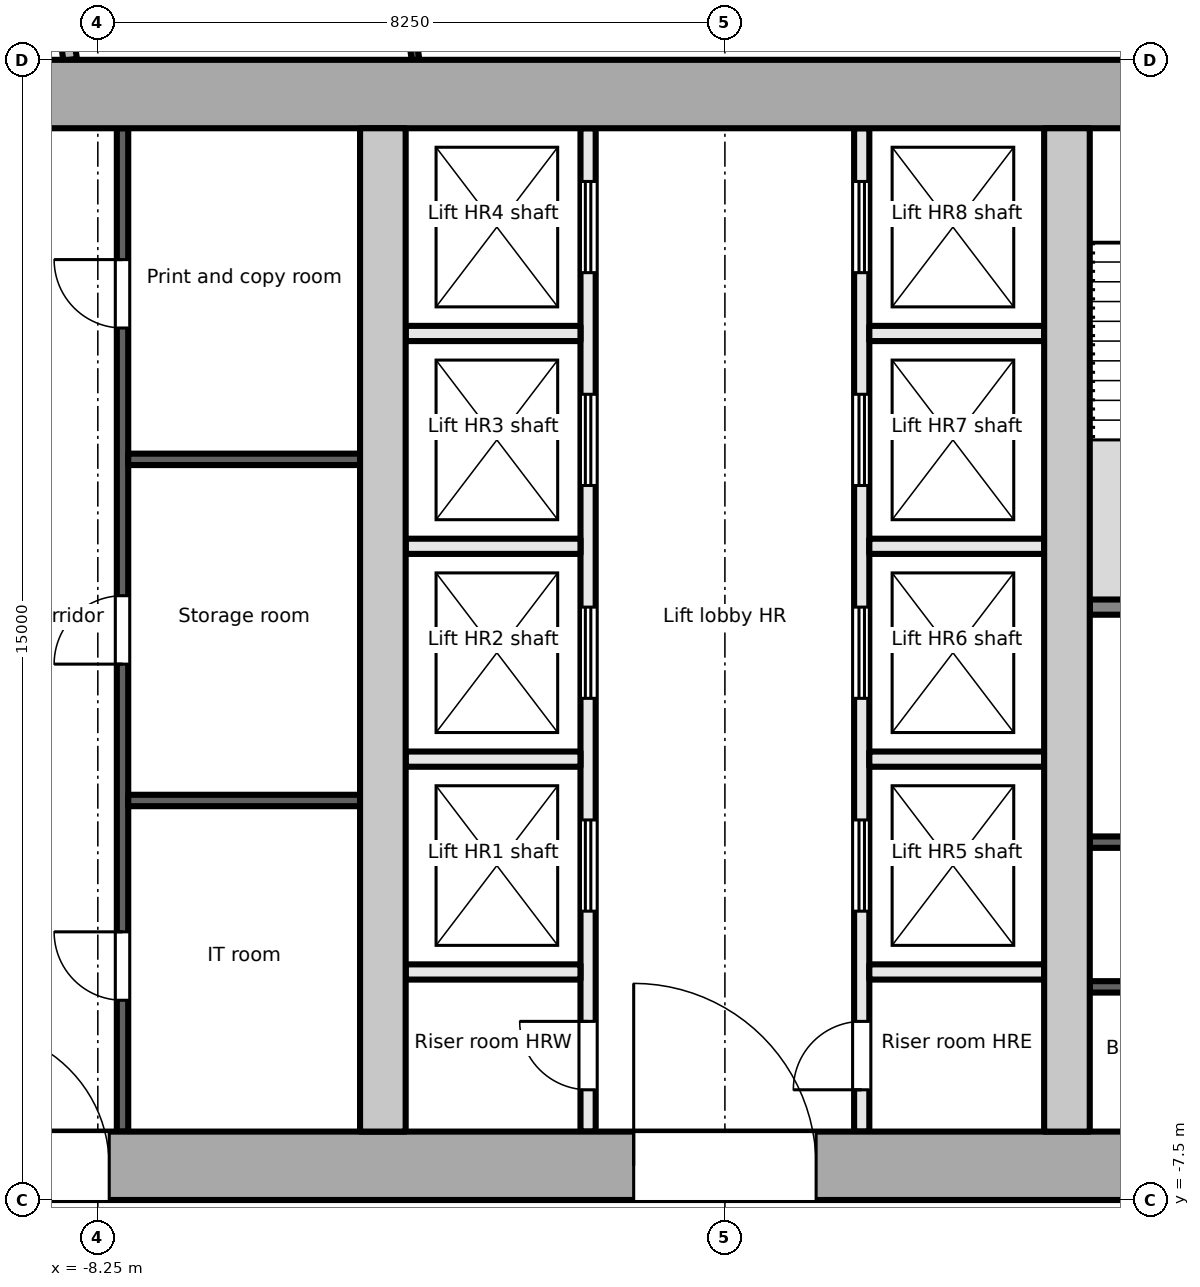
"""IFC4 building model, lengths in metres.
Left out: names, types, materials, properties, quantities, classifications, styles, units other than length and angle.
Written with IfcOpenShell. Run it as: python <this file> out.ifc"""

import sys

from ifc_helpers import new_model, si_unit, direction, frame, frame_2d, origin, place, context, subcontext, project, spatial, rectangle, extrude, element, fill, save


model = new_model("IFC4")
c1 = context("Model", 3, precision=1e-05, world=origin(), true_north=direction((0.0, 1.0)))
c2 = subcontext(c1, "Body", "Model", "MODEL_VIEW")
j1 = project(units=[si_unit("LENGTHUNIT", "METRE"), si_unit("PLANEANGLEUNIT", "RADIAN")], contexts=[c1])
p1 = place(None, origin())
s1 = spatial("IfcSite", under=j1, at=p1, CompositionType="ELEMENT")
p2 = place(p1, origin())
s2 = spatial("IfcBuilding", under=s1, at=p2, CompositionType="ELEMENT")
p3 = place(p2, frame((0.0, 0.0, 262.9)))
s3 = spatial("IfcBuildingStorey", under=s2, at=p3, CompositionType="ELEMENT", Elevation=262.9)
p4 = place(p3, frame((-18.0, -7.05, -0.2), z_axis=(0.0, 0.0, 1.0), x_axis=(1.0, 0.0, 0.0)))
e1 = element("IfcWall", 1, at=p4, inside=s3, PredefinedType="SHEAR", context=c2, shape_type="SweptSolid", body=[
    extrude(rectangle(XDim=36.0, YDim=0.9, at=frame_2d((18.0, 0.0))), origin(), (0.0, 0.0, 1.0), 3.9),
])
p5 = place(p4, frame((8.1, 0.0, 0.2)))
e2 = element("IfcOpeningElement", 2, at=p5, cuts=e1, PredefinedType="OPENING", context=c2, shape_type="SweptSolid", body=[
    extrude(rectangle(XDim=1.8, YDim=2.1, at=frame_2d((0.9, 1.05))), frame((0.0, 0.46, 0.0), z_axis=(0.0, -1.0, 0.0), x_axis=(1.0, 0.0, 0.0)), (0.0, 0.0, 1.0), 0.921),
])
p6 = place(p4, frame((16.8, 0.0, 0.2)))
e3 = element("IfcOpeningElement", 3, at=p6, cuts=e1, PredefinedType="OPENING", context=c2, shape_type="SweptSolid", body=[
    extrude(rectangle(XDim=2.4, YDim=2.1, at=frame_2d((1.2, 1.05))), frame((0.0, 0.46, 0.0), z_axis=(0.0, -1.0, 0.0), x_axis=(1.0, 0.0, 0.0)), (0.0, 0.0, 1.0), 0.921),
])
p7 = place(p4, frame((26.1, 0.0, 0.2)))
e4 = element("IfcOpeningElement", 4, at=p7, cuts=e1, PredefinedType="OPENING", context=c2, shape_type="SweptSolid", body=[
    extrude(rectangle(XDim=2.4, YDim=2.1, at=frame_2d((1.2, 1.05))), frame((0.0, 0.46, 0.0), z_axis=(0.0, -1.0, 0.0), x_axis=(1.0, 0.0, 0.0)), (0.0, 0.0, 1.0), 0.921),
])
p8 = place(p3, frame((-18.0, 7.05, -0.2), z_axis=(0.0, 0.0, 1.0), x_axis=(1.0, 0.0, 0.0)))
e5 = element("IfcWall", 5, at=p8, inside=s3, PredefinedType="SHEAR", context=c2, shape_type="SweptSolid", body=[
    extrude(rectangle(XDim=36.0, YDim=0.9, at=frame_2d((18.0, 0.0))), origin(), (0.0, 0.0, 1.0), 3.9),
])
for number, where, z_axis, x_axis in (
    (6, (-4.5, -6.6, -0.2), (0.0, 0.0, 1.0), (0.0, 1.0, 0.0)),
    (7, (4.5, -6.6, -0.2), (0.0, 0.0, 1.0), (0.0, 1.0, 0.0)),
):
    element("IfcWall", number, at=place(p3, frame(where, z_axis=z_axis, x_axis=x_axis)), inside=s3, PredefinedType="SHEAR", context=c2, shape_type="SweptSolid", body=[
        extrude(rectangle(XDim=13.2, YDim=0.6, at=frame_2d((6.6, 0.0))), origin(), (0.0, 0.0, 1.0), 3.9),
    ])
p9 = place(p3, frame((-7.925, -6.6, 0.0), z_axis=(0.0, 0.0, 1.0), x_axis=(0.0, 1.0, 0.0)))
e8 = element("IfcWall", 8, at=p9, inside=s3, PredefinedType="PARTITIONING", context=c2, shape_type="SweptSolid", body=[
    extrude(rectangle(XDim=13.2, YDim=0.15, at=frame_2d((6.6, 0.0))), origin(), (0.0, 0.0, 1.0), 3.7),
])
p10 = place(p9, frame((1.728, 0.0, 0.0)))
e9 = element("IfcOpeningElement", 9, at=p10, cuts=e8, PredefinedType="OPENING", context=c2, shape_type="SweptSolid", body=[
    extrude(rectangle(XDim=0.9, YDim=2.1, at=frame_2d((0.45, 1.05))), frame((0.0, 0.085, 0.0), z_axis=(0.0, -1.0, 0.0), x_axis=(1.0, 0.0, 0.0)), (0.0, 0.0, 1.0), 0.171),
])
p11 = place(p9, frame((6.15, 0.0, 0.0)))
e10 = element("IfcOpeningElement", 10, at=p11, cuts=e8, PredefinedType="OPENING", context=c2, shape_type="SweptSolid", body=[
    extrude(rectangle(XDim=0.9, YDim=2.1, at=frame_2d((0.45, 1.05))), frame((0.0, 0.085, 0.0), z_axis=(0.0, -1.0, 0.0), x_axis=(1.0, 0.0, 0.0)), (0.0, 0.0, 1.0), 0.171),
])
p12 = place(p9, frame((10.572, 0.0, 0.0)))
e11 = element("IfcOpeningElement", 11, at=p12, cuts=e8, PredefinedType="OPENING", context=c2, shape_type="SweptSolid", body=[
    extrude(rectangle(XDim=0.9, YDim=2.1, at=frame_2d((0.45, 1.05))), frame((0.0, 0.085, 0.0), z_axis=(0.0, -1.0, 0.0), x_axis=(1.0, 0.0, 0.0)), (0.0, 0.0, 1.0), 0.171),
])
for number, where, z_axis, x_axis in (
    (12, (-7.85, -2.244, 0.0), (0.0, 0.0, 1.0), (1.0, 0.0, 0.0)),
    (13, (-7.85, 2.244, 0.0), (0.0, 0.0, 1.0), (1.0, 0.0, 0.0)),
):
    element("IfcWall", number, at=place(p3, frame(where, z_axis=z_axis, x_axis=x_axis)), inside=s3, PredefinedType="PARTITIONING", context=c2, shape_type="SweptSolid", body=[
        extrude(rectangle(XDim=3.05, YDim=0.15, at=frame_2d((1.525, 0.0))), origin(), (0.0, 0.0, 1.0), 3.7),
    ])
p13 = place(p3, frame((-1.8, -6.6, 0.0), z_axis=(0.0, 0.0, 1.0), x_axis=(0.0, 1.0, 0.0)))
e14 = element("IfcWall", 14, at=p13, inside=s3, PredefinedType="PARTITIONING", context=c2, shape_type="SweptSolid", body=[
    extrude(rectangle(XDim=13.2, YDim=0.2, at=frame_2d((6.6, 0.0))), origin(), (0.0, 0.0, 1.0), 3.7),
])
p14 = place(p13, frame((0.55, 0.0, 0.0)))
e15 = element("IfcOpeningElement", 15, at=p14, cuts=e14, PredefinedType="OPENING", context=c2, shape_type="SweptSolid", body=[
    extrude(rectangle(XDim=0.9, YDim=2.1, at=frame_2d((0.45, 1.05))), frame((0.0, 0.111, 0.0), z_axis=(0.0, -1.0, 0.0), x_axis=(1.0, 0.0, 0.0)), (0.0, 0.0, 1.0), 0.221),
])
p15 = place(p13, frame((2.9, 0.0, 0.0)))
e16 = element("IfcOpeningElement", 16, at=p15, cuts=e14, PredefinedType="OPENING", context=c2, shape_type="SweptSolid", body=[
    extrude(rectangle(XDim=1.2, YDim=2.1, at=frame_2d((0.6, 1.05))), frame((0.0, 0.111, 0.0), z_axis=(0.0, -1.0, 0.0), x_axis=(1.0, 0.0, 0.0)), (0.0, 0.0, 1.0), 0.221),
])
p16 = place(p13, frame((5.7, 0.0, 0.0)))
e17 = element("IfcOpeningElement", 17, at=p16, cuts=e14, PredefinedType="OPENING", context=c2, shape_type="SweptSolid", body=[
    extrude(rectangle(XDim=1.2, YDim=2.1, at=frame_2d((0.6, 1.05))), frame((0.0, 0.111, 0.0), z_axis=(0.0, -1.0, 0.0), x_axis=(1.0, 0.0, 0.0)), (0.0, 0.0, 1.0), 0.221),
])
p17 = place(p13, frame((8.5, 0.0, 0.0)))
e18 = element("IfcOpeningElement", 18, at=p17, cuts=e14, PredefinedType="OPENING", context=c2, shape_type="SweptSolid", body=[
    extrude(rectangle(XDim=1.2, YDim=2.1, at=frame_2d((0.6, 1.05))), frame((0.0, 0.111, 0.0), z_axis=(0.0, -1.0, 0.0), x_axis=(1.0, 0.0, 0.0)), (0.0, 0.0, 1.0), 0.221),
])
p18 = place(p13, frame((11.3, 0.0, 0.0)))
e19 = element("IfcOpeningElement", 19, at=p18, cuts=e14, PredefinedType="OPENING", context=c2, shape_type="SweptSolid", body=[
    extrude(rectangle(XDim=1.2, YDim=2.1, at=frame_2d((0.6, 1.05))), frame((0.0, 0.111, 0.0), z_axis=(0.0, -1.0, 0.0), x_axis=(1.0, 0.0, 0.0)), (0.0, 0.0, 1.0), 0.221),
])
p19 = place(p3, frame((1.8, -6.6, 0.0), z_axis=(0.0, 0.0, 1.0), x_axis=(0.0, 1.0, 0.0)))
e20 = element("IfcWall", 20, at=p19, inside=s3, PredefinedType="PARTITIONING", context=c2, shape_type="SweptSolid", body=[
    extrude(rectangle(XDim=13.2, YDim=0.2, at=frame_2d((6.6, 0.0))), origin(), (0.0, 0.0, 1.0), 3.7),
])
p20 = place(p19, frame((0.55, 0.0, 0.0)))
e21 = element("IfcOpeningElement", 21, at=p20, cuts=e20, PredefinedType="OPENING", context=c2, shape_type="SweptSolid", body=[
    extrude(rectangle(XDim=0.9, YDim=2.1, at=frame_2d((0.45, 1.05))), frame((0.0, 0.111, 0.0), z_axis=(0.0, -1.0, 0.0), x_axis=(1.0, 0.0, 0.0)), (0.0, 0.0, 1.0), 0.221),
])
p21 = place(p19, frame((2.9, 0.0, 0.0)))
e22 = element("IfcOpeningElement", 22, at=p21, cuts=e20, PredefinedType="OPENING", context=c2, shape_type="SweptSolid", body=[
    extrude(rectangle(XDim=1.2, YDim=2.1, at=frame_2d((0.6, 1.05))), frame((0.0, 0.111, 0.0), z_axis=(0.0, -1.0, 0.0), x_axis=(1.0, 0.0, 0.0)), (0.0, 0.0, 1.0), 0.221),
])
p22 = place(p19, frame((5.7, 0.0, 0.0)))
e23 = element("IfcOpeningElement", 23, at=p22, cuts=e20, PredefinedType="OPENING", context=c2, shape_type="SweptSolid", body=[
    extrude(rectangle(XDim=1.2, YDim=2.1, at=frame_2d((0.6, 1.05))), frame((0.0, 0.111, 0.0), z_axis=(0.0, -1.0, 0.0), x_axis=(1.0, 0.0, 0.0)), (0.0, 0.0, 1.0), 0.221),
])
p23 = place(p19, frame((8.5, 0.0, 0.0)))
e24 = element("IfcOpeningElement", 24, at=p23, cuts=e20, PredefinedType="OPENING", context=c2, shape_type="SweptSolid", body=[
    extrude(rectangle(XDim=1.2, YDim=2.1, at=frame_2d((0.6, 1.05))), frame((0.0, 0.111, 0.0), z_axis=(0.0, -1.0, 0.0), x_axis=(1.0, 0.0, 0.0)), (0.0, 0.0, 1.0), 0.221),
])
p24 = place(p19, frame((11.3, 0.0, 0.0)))
e25 = element("IfcOpeningElement", 25, at=p24, cuts=e20, PredefinedType="OPENING", context=c2, shape_type="SweptSolid", body=[
    extrude(rectangle(XDim=1.2, YDim=2.1, at=frame_2d((0.6, 1.05))), frame((0.0, 0.111, 0.0), z_axis=(0.0, -1.0, 0.0), x_axis=(1.0, 0.0, 0.0)), (0.0, 0.0, 1.0), 0.221),
])
for number, where, z_axis, x_axis in (
    (26, (-4.2, -1.7, 0.0), (0.0, 0.0, 1.0), (1.0, 0.0, 0.0)),
    (27, (-4.2, 1.1, 0.0), (0.0, 0.0, 1.0), (1.0, 0.0, 0.0)),
    (28, (-4.2, 3.9, 0.0), (0.0, 0.0, 1.0), (1.0, 0.0, 0.0)),
    (29, (-4.2, -4.5, 0.0), (0.0, 0.0, 1.0), (1.0, 0.0, 0.0)),
    (30, (1.9, -1.7, 0.0), (0.0, 0.0, 1.0), (1.0, 0.0, 0.0)),
    (31, (1.9, 1.1, 0.0), (0.0, 0.0, 1.0), (1.0, 0.0, 0.0)),
    (32, (1.9, 3.9, 0.0), (0.0, 0.0, 1.0), (1.0, 0.0, 0.0)),
    (33, (1.9, -4.5, 0.0), (0.0, 0.0, 1.0), (1.0, 0.0, 0.0)),
):
    element("IfcWall", number, at=place(p3, frame(where, z_axis=z_axis, x_axis=x_axis)), inside=s3, PredefinedType="PARTITIONING", context=c2, shape_type="SweptSolid", body=[
        extrude(rectangle(XDim=2.3, YDim=0.2, at=frame_2d((1.15, 0.0))), origin(), (0.0, 0.0, 1.0), 3.7),
    ])
p25 = place(p3, frame((4.8, 0.3, 0.0), z_axis=(0.0, 0.0, 1.0), x_axis=(1.0, 0.0, 0.0)))
e34 = element("IfcWall", 34, at=p25, inside=s3, PredefinedType="PARTITIONING", context=c2, shape_type="SweptSolid", body=[
    extrude(rectangle(XDim=3.15, YDim=0.2, at=frame_2d((1.575, 0.0))), origin(), (0.0, 0.0, 1.0), 3.7),
])
for number, where, z_axis, x_axis in (
    (35, (4.8, -4.696, 0.0), (0.0, 0.0, 1.0), (1.0, 0.0, 0.0)),
    (36, (4.8, -2.792, 0.0), (0.0, 0.0, 1.0), (1.0, 0.0, 0.0)),
):
    element("IfcWall", number, at=place(p3, frame(where, z_axis=z_axis, x_axis=x_axis)), inside=s3, PredefinedType="PARTITIONING", context=c2, shape_type="SweptSolid", body=[
        extrude(rectangle(XDim=3.15, YDim=0.15, at=frame_2d((1.575, 0.0))), origin(), (0.0, 0.0, 1.0), 3.7),
    ])
p26 = place(p3, frame((-9.273, 12.191, 0.0), z_axis=(0.0, 0.0, 1.0), x_axis=(0.139104789371, -0.990277666907, 0.0)))
e37 = element("IfcWall", 37, at=p26, inside=s3, PredefinedType="PARTITIONING", context=c2, shape_type="SweptSolid", body=[
    extrude(rectangle(XDim=4.737, YDim=0.18, at=frame_2d((2.369, 0.0))), origin(), (0.0, 0.0, 1.0), 3.4),
])
p27 = place(p3, frame((-4.07, 7.5, 0.0), z_axis=(0.0, 0.0, 1.0), x_axis=(-0.139122430522, 0.990275188685, 0.0)))
e38 = element("IfcWall", 38, at=p27, inside=s3, PredefinedType="PARTITIONING", context=c2, shape_type="SweptSolid", body=[
    extrude(rectangle(XDim=5.368, YDim=0.1, at=frame_2d((2.684, 0.0))), origin(), (0.0, 0.0, 1.0), 3.4),
])
p28 = place(p27, frame((3.098, 0.0, 0.0)))
e39 = element("IfcOpeningElement", 39, at=p28, cuts=e38, PredefinedType="OPENING", context=c2, shape_type="SweptSolid", body=[
    extrude(rectangle(XDim=0.8, YDim=2.1, at=frame_2d((0.4, 1.05))), frame((0.0, 0.061, 0.0), z_axis=(0.0, -1.0, 0.0), x_axis=(1.0, 0.0, 0.0)), (0.0, 0.0, 1.0), 0.121),
])
p29 = place(p27, frame((0.649, 0.0, 0.9)))
e40 = element("IfcOpeningElement", 40, at=p29, cuts=e38, PredefinedType="OPENING", context=c2, shape_type="SweptSolid", body=[
    extrude(rectangle(XDim=1.8, YDim=1.2, at=frame_2d((0.9, 0.6))), frame((0.0, 0.061, 0.0), z_axis=(0.0, -1.0, 0.0), x_axis=(1.0, 0.0, 0.0)), (0.0, 0.0, 1.0), 0.121),
])
p30 = place(p10, origin())
e41 = element("IfcDoor", 41, at=p30, inside=s3, OperationType="SINGLE_SWING_RIGHT", PredefinedType="DOOR", context=c2, shape_type="SweptSolid", body=[
    extrude(rectangle(XDim=0.9, YDim=2.1, at=frame_2d((0.45, 1.05))), frame((0.0, 0.025, 0.0), z_axis=(0.0, -1.0, 0.0), x_axis=(1.0, 0.0, 0.0)), (0.0, 0.0, 1.0), 0.05),
])
fill(e9, e41)
p31 = place(p11, origin())
e42 = element("IfcDoor", 42, at=p31, inside=s3, OperationType="SINGLE_SWING_LEFT", PredefinedType="DOOR", context=c2, shape_type="SweptSolid", body=[
    extrude(rectangle(XDim=0.9, YDim=2.1, at=frame_2d((0.45, 1.05))), frame((0.0, 0.025, 0.0), z_axis=(0.0, -1.0, 0.0), x_axis=(1.0, 0.0, 0.0)), (0.0, 0.0, 1.0), 0.05),
])
fill(e10, e42)
p32 = place(p12, origin())
e43 = element("IfcDoor", 43, at=p32, inside=s3, OperationType="SINGLE_SWING_RIGHT", PredefinedType="DOOR", context=c2, shape_type="SweptSolid", body=[
    extrude(rectangle(XDim=0.9, YDim=2.1, at=frame_2d((0.45, 1.05))), frame((0.0, 0.025, 0.0), z_axis=(0.0, -1.0, 0.0), x_axis=(1.0, 0.0, 0.0)), (0.0, 0.0, 1.0), 0.05),
])
fill(e11, e43)
p33 = place(p5, origin())
e44 = element("IfcDoor", 44, at=p33, inside=s3, OperationType="SINGLE_SWING_LEFT", PredefinedType="DOOR", context=c2, shape_type="SweptSolid", body=[
    extrude(rectangle(XDim=1.8, YDim=2.1, at=frame_2d((0.9, 1.05))), frame((0.0, 0.025, 0.0), z_axis=(0.0, -1.0, 0.0), x_axis=(1.0, 0.0, 0.0)), (0.0, 0.0, 1.0), 0.05),
])
fill(e2, e44)
p34 = place(p14, origin())
e45 = element("IfcDoor", 45, at=p34, inside=s3, OperationType="SINGLE_SWING_RIGHT", PredefinedType="DOOR", context=c2, shape_type="SweptSolid", body=[
    extrude(rectangle(XDim=0.9, YDim=2.1, at=frame_2d((0.45, 1.05))), frame((0.0, 0.025, 0.0), z_axis=(0.0, -1.0, 0.0), x_axis=(1.0, 0.0, 0.0)), (0.0, 0.0, 1.0), 0.05),
])
fill(e15, e45)
p35 = place(p15, origin())
e46 = element("IfcDoor", 46, at=p35, inside=s3, OperationType="DOUBLE_DOOR_SLIDING", PredefinedType="DOOR", context=c2, shape_type="SweptSolid", body=[
    extrude(rectangle(XDim=1.2, YDim=2.1, at=frame_2d((0.6, 1.05))), frame((0.0, 0.025, 0.0), z_axis=(0.0, -1.0, 0.0), x_axis=(1.0, 0.0, 0.0)), (0.0, 0.0, 1.0), 0.05),
])
fill(e16, e46)
p36 = place(p16, origin())
e47 = element("IfcDoor", 47, at=p36, inside=s3, OperationType="DOUBLE_DOOR_SLIDING", PredefinedType="DOOR", context=c2, shape_type="SweptSolid", body=[
    extrude(rectangle(XDim=1.2, YDim=2.1, at=frame_2d((0.6, 1.05))), frame((0.0, 0.025, 0.0), z_axis=(0.0, -1.0, 0.0), x_axis=(1.0, 0.0, 0.0)), (0.0, 0.0, 1.0), 0.05),
])
fill(e17, e47)
p37 = place(p17, origin())
e48 = element("IfcDoor", 48, at=p37, inside=s3, OperationType="DOUBLE_DOOR_SLIDING", PredefinedType="DOOR", context=c2, shape_type="SweptSolid", body=[
    extrude(rectangle(XDim=1.2, YDim=2.1, at=frame_2d((0.6, 1.05))), frame((0.0, 0.025, 0.0), z_axis=(0.0, -1.0, 0.0), x_axis=(1.0, 0.0, 0.0)), (0.0, 0.0, 1.0), 0.05),
])
fill(e18, e48)
p38 = place(p18, origin())
e49 = element("IfcDoor", 49, at=p38, inside=s3, OperationType="DOUBLE_DOOR_SLIDING", PredefinedType="DOOR", context=c2, shape_type="SweptSolid", body=[
    extrude(rectangle(XDim=1.2, YDim=2.1, at=frame_2d((0.6, 1.05))), frame((0.0, 0.025, 0.0), z_axis=(0.0, -1.0, 0.0), x_axis=(1.0, 0.0, 0.0)), (0.0, 0.0, 1.0), 0.05),
])
fill(e19, e49)
p39 = place(p20, origin())
e50 = element("IfcDoor", 50, at=p39, inside=s3, OperationType="SINGLE_SWING_LEFT", PredefinedType="DOOR", context=c2, shape_type="SweptSolid", body=[
    extrude(rectangle(XDim=0.9, YDim=2.1, at=frame_2d((0.45, 1.05))), frame((0.0, 0.025, 0.0), z_axis=(0.0, -1.0, 0.0), x_axis=(1.0, 0.0, 0.0)), (0.0, 0.0, 1.0), 0.05),
])
fill(e21, e50)
p40 = place(p21, origin())
e51 = element("IfcDoor", 51, at=p40, inside=s3, OperationType="DOUBLE_DOOR_SLIDING", PredefinedType="DOOR", context=c2, shape_type="SweptSolid", body=[
    extrude(rectangle(XDim=1.2, YDim=2.1, at=frame_2d((0.6, 1.05))), frame((0.0, 0.025, 0.0), z_axis=(0.0, -1.0, 0.0), x_axis=(1.0, 0.0, 0.0)), (0.0, 0.0, 1.0), 0.05),
])
fill(e22, e51)
p41 = place(p22, origin())
e52 = element("IfcDoor", 52, at=p41, inside=s3, OperationType="DOUBLE_DOOR_SLIDING", PredefinedType="DOOR", context=c2, shape_type="SweptSolid", body=[
    extrude(rectangle(XDim=1.2, YDim=2.1, at=frame_2d((0.6, 1.05))), frame((0.0, 0.025, 0.0), z_axis=(0.0, -1.0, 0.0), x_axis=(1.0, 0.0, 0.0)), (0.0, 0.0, 1.0), 0.05),
])
fill(e23, e52)
p42 = place(p23, origin())
e53 = element("IfcDoor", 53, at=p42, inside=s3, OperationType="DOUBLE_DOOR_SLIDING", PredefinedType="DOOR", context=c2, shape_type="SweptSolid", body=[
    extrude(rectangle(XDim=1.2, YDim=2.1, at=frame_2d((0.6, 1.05))), frame((0.0, 0.025, 0.0), z_axis=(0.0, -1.0, 0.0), x_axis=(1.0, 0.0, 0.0)), (0.0, 0.0, 1.0), 0.05),
])
fill(e24, e53)
p43 = place(p24, origin())
e54 = element("IfcDoor", 54, at=p43, inside=s3, OperationType="DOUBLE_DOOR_SLIDING", PredefinedType="DOOR", context=c2, shape_type="SweptSolid", body=[
    extrude(rectangle(XDim=1.2, YDim=2.1, at=frame_2d((0.6, 1.05))), frame((0.0, 0.025, 0.0), z_axis=(0.0, -1.0, 0.0), x_axis=(1.0, 0.0, 0.0)), (0.0, 0.0, 1.0), 0.05),
])
fill(e25, e54)
p44 = place(p6, origin())
e55 = element("IfcDoor", 55, at=p44, inside=s3, OperationType="DOUBLE_DOOR_DOUBLE_SWING", PredefinedType="DOOR", context=c2, shape_type="SweptSolid", body=[
    extrude(rectangle(XDim=2.4, YDim=2.1, at=frame_2d((1.2, 1.05))), frame((0.0, 0.025, 0.0), z_axis=(0.0, -1.0, 0.0), x_axis=(1.0, 0.0, 0.0)), (0.0, 0.0, 1.0), 0.05),
])
fill(e3, e55)
save(model, sys.argv[1])
